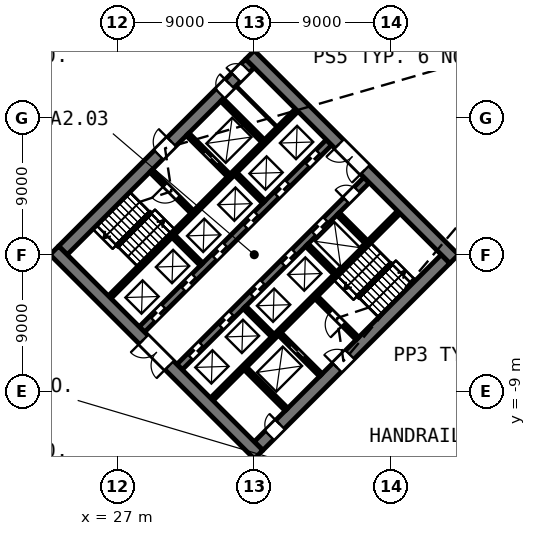
"""IFC4 building model, lengths in metres.
Left out: names, types, materials, properties, quantities, classifications, styles, units other than length and angle.
Written with IfcOpenShell. Run it as: python <this file> out.ifc"""

import sys

from ifc_helpers import new_model, si_unit, direction, frame, frame_2d, origin, place, context, subcontext, project, spatial, rectangle, extrude, element, fill, save


model = new_model("IFC4")
c1 = context("Model", 3, precision=1e-05, world=origin(), true_north=direction((0.0, 1.0)))
c2 = subcontext(c1, "Body", "Model", "MODEL_VIEW")
j1 = project(units=[si_unit("LENGTHUNIT", "METRE"), si_unit("PLANEANGLEUNIT", "RADIAN")], contexts=[c1])
p1 = place(None, origin())
s1 = spatial("IfcSite", under=j1, at=p1, CompositionType="ELEMENT")
p2 = place(p1, origin())
s2 = spatial("IfcBuilding", under=s1, at=p2, CompositionType="ELEMENT")
p3 = place(p2, origin())
s3 = spatial("IfcBuildingStorey", under=s2, at=p3, CompositionType="ELEMENT", Elevation=0.0)
p4 = place(p3, frame((36.283, -12.586, 0.0), z_axis=(0.0, 0.0, 1.0), x_axis=(0.707106781187, 0.707106781187, 0.0)))
e1 = element("IfcWall", 1, at=p4, inside=s3, PredefinedType="SHEAR", context=c2, shape_type="SweptSolid", body=[
    extrude(rectangle(XDim=17.4, YDim=0.8, at=frame_2d((8.7, 0.0))), origin(), (0.0, 0.0, 1.0), 6.9),
])
p5 = place(p4, frame((7.3, 0.0, 0.0)))
e2 = element("IfcOpeningElement", 2, at=p5, cuts=e1, PredefinedType="OPENING", context=c2, shape_type="SweptSolid", body=[
    extrude(rectangle(XDim=1.2, YDim=2.1, at=frame_2d((0.6, 1.05))), frame((0.0, 0.41, 0.0), z_axis=(0.0, -1.0, 0.0), x_axis=(1.0, 0.0, 0.0)), (0.0, 0.0, 1.0), 0.82),
])
p6 = place(p4, frame((1.0, 0.0, 0.0)))
e3 = element("IfcOpeningElement", 3, at=p6, cuts=e1, PredefinedType="OPENING", context=c2, shape_type="SweptSolid", body=[
    extrude(rectangle(XDim=1.0, YDim=2.1, at=frame_2d((0.5, 1.05))), frame((0.0, 0.41, 0.0), z_axis=(0.0, -1.0, 0.0), x_axis=(1.0, 0.0, 0.0)), (0.0, 0.0, 1.0), 0.82),
])
p7 = place(p3, frame((33.207, -9.51, 0.0), z_axis=(0.0, 0.0, 1.0), x_axis=(0.707106781187, 0.707106781187, 0.0)))
e4 = element("IfcWall", 4, at=p7, inside=s3, PredefinedType="SHEAR", context=c2, shape_type="SweptSolid", body=[
    extrude(rectangle(XDim=17.4, YDim=0.25, at=frame_2d((8.7, 0.0))), origin(), (0.0, 0.0, 1.0), 6.9),
])
p8 = place(p3, frame((31.086, -7.389, 0.0), z_axis=(0.0, 0.0, 1.0), x_axis=(0.707106781187, 0.707106781187, 0.0)))
e5 = element("IfcWall", 5, at=p8, inside=s3, PredefinedType="SHEAR", context=c2, shape_type="SweptSolid", body=[
    extrude(rectangle(XDim=17.4, YDim=0.5, at=frame_2d((8.7, 0.0))), origin(), (0.0, 0.0, 1.0), 6.9),
])
p9 = place(p8, frame((0.962, 0.0, 0.0)))
e6 = element("IfcOpeningElement", 6, at=p9, cuts=e5, PredefinedType="OPENING", context=c2, shape_type="SweptSolid", body=[
    extrude(rectangle(XDim=1.1, YDim=2.1, at=frame_2d((0.55, 1.05))), frame((0.0, 0.26, 0.0), z_axis=(0.0, -1.0, 0.0), x_axis=(1.0, 0.0, 0.0)), (0.0, 0.0, 1.0), 0.52),
])
p10 = place(p8, frame((3.8, 0.0, 0.0)))
e7 = element("IfcOpeningElement", 7, at=p10, cuts=e5, PredefinedType="OPENING", context=c2, shape_type="SweptSolid", body=[
    extrude(rectangle(XDim=1.1, YDim=2.1, at=frame_2d((0.55, 1.05))), frame((0.0, 0.26, 0.0), z_axis=(0.0, -1.0, 0.0), x_axis=(1.0, 0.0, 0.0)), (0.0, 0.0, 1.0), 0.52),
])
p11 = place(p8, frame((6.7, 0.0, 0.0)))
e8 = element("IfcOpeningElement", 8, at=p11, cuts=e5, PredefinedType="OPENING", context=c2, shape_type="SweptSolid", body=[
    extrude(rectangle(XDim=1.1, YDim=2.1, at=frame_2d((0.55, 1.05))), frame((0.0, 0.26, 0.0), z_axis=(0.0, -1.0, 0.0), x_axis=(1.0, 0.0, 0.0)), (0.0, 0.0, 1.0), 0.52),
])
p12 = place(p8, frame((9.6, 0.0, 0.0)))
e9 = element("IfcOpeningElement", 9, at=p12, cuts=e5, PredefinedType="OPENING", context=c2, shape_type="SweptSolid", body=[
    extrude(rectangle(XDim=1.1, YDim=2.1, at=frame_2d((0.55, 1.05))), frame((0.0, 0.26, 0.0), z_axis=(0.0, -1.0, 0.0), x_axis=(1.0, 0.0, 0.0)), (0.0, 0.0, 1.0), 0.52),
])
p13 = place(p8, frame((12.45, 0.0, 0.0)))
e10 = element("IfcOpeningElement", 10, at=p13, cuts=e5, PredefinedType="OPENING", context=c2, shape_type="SweptSolid", body=[
    extrude(rectangle(XDim=1.2, YDim=2.1, at=frame_2d((0.6, 1.05))), frame((0.0, 0.26, 0.0), z_axis=(0.0, -1.0, 0.0), x_axis=(1.0, 0.0, 0.0)), (0.0, 0.0, 1.0), 0.52),
])
p14 = place(p8, frame((15.5, 0.0, 0.0)))
e11 = element("IfcOpeningElement", 11, at=p14, cuts=e5, PredefinedType="OPENING", context=c2, shape_type="SweptSolid", body=[
    extrude(rectangle(XDim=1.0, YDim=2.1, at=frame_2d((0.5, 1.05))), frame((0.0, 0.26, 0.0), z_axis=(0.0, -1.0, 0.0), x_axis=(1.0, 0.0, 0.0)), (0.0, 0.0, 1.0), 0.52),
])
p15 = place(p3, frame((28.611, -4.914, 0.0), z_axis=(0.0, 0.0, 1.0), x_axis=(0.707106781187, 0.707106781187, 0.0)))
e12 = element("IfcWall", 12, at=p15, inside=s3, PredefinedType="SHEAR", context=c2, shape_type="SweptSolid", body=[
    extrude(rectangle(XDim=17.4, YDim=0.5, at=frame_2d((8.7, 0.0))), origin(), (0.0, 0.0, 1.0), 6.9),
])
p16 = place(p15, frame((0.962, 0.0, 0.0)))
e13 = element("IfcOpeningElement", 13, at=p16, cuts=e12, PredefinedType="OPENING", context=c2, shape_type="SweptSolid", body=[
    extrude(rectangle(XDim=1.1, YDim=2.1, at=frame_2d((0.55, 1.05))), frame((0.0, 0.26, 0.0), z_axis=(0.0, -1.0, 0.0), x_axis=(1.0, 0.0, 0.0)), (0.0, 0.0, 1.0), 0.52),
])
p17 = place(p15, frame((3.8, 0.0, 0.0)))
e14 = element("IfcOpeningElement", 14, at=p17, cuts=e12, PredefinedType="OPENING", context=c2, shape_type="SweptSolid", body=[
    extrude(rectangle(XDim=1.1, YDim=2.1, at=frame_2d((0.55, 1.05))), frame((0.0, 0.26, 0.0), z_axis=(0.0, -1.0, 0.0), x_axis=(1.0, 0.0, 0.0)), (0.0, 0.0, 1.0), 0.52),
])
p18 = place(p15, frame((6.7, 0.0, 0.0)))
e15 = element("IfcOpeningElement", 15, at=p18, cuts=e12, PredefinedType="OPENING", context=c2, shape_type="SweptSolid", body=[
    extrude(rectangle(XDim=1.1, YDim=2.1, at=frame_2d((0.55, 1.05))), frame((0.0, 0.26, 0.0), z_axis=(0.0, -1.0, 0.0), x_axis=(1.0, 0.0, 0.0)), (0.0, 0.0, 1.0), 0.52),
])
p19 = place(p15, frame((9.6, 0.0, 0.0)))
e16 = element("IfcOpeningElement", 16, at=p19, cuts=e12, PredefinedType="OPENING", context=c2, shape_type="SweptSolid", body=[
    extrude(rectangle(XDim=1.1, YDim=2.1, at=frame_2d((0.55, 1.05))), frame((0.0, 0.26, 0.0), z_axis=(0.0, -1.0, 0.0), x_axis=(1.0, 0.0, 0.0)), (0.0, 0.0, 1.0), 0.52),
])
p20 = place(p15, frame((12.5, 0.0, 0.0)))
e17 = element("IfcOpeningElement", 17, at=p20, cuts=e12, PredefinedType="OPENING", context=c2, shape_type="SweptSolid", body=[
    extrude(rectangle(XDim=1.1, YDim=2.1, at=frame_2d((0.55, 1.05))), frame((0.0, 0.26, 0.0), z_axis=(0.0, -1.0, 0.0), x_axis=(1.0, 0.0, 0.0)), (0.0, 0.0, 1.0), 0.52),
])
p21 = place(p15, frame((15.337, 0.0, 0.0)))
e18 = element("IfcOpeningElement", 18, at=p21, cuts=e12, PredefinedType="OPENING", context=c2, shape_type="SweptSolid", body=[
    extrude(rectangle(XDim=1.1, YDim=2.1, at=frame_2d((0.55, 1.05))), frame((0.0, 0.26, 0.0), z_axis=(0.0, -1.0, 0.0), x_axis=(1.0, 0.0, 0.0)), (0.0, 0.0, 1.0), 0.52),
])
p22 = place(p3, frame((26.49, -2.793, 0.0), z_axis=(0.0, 0.0, 1.0), x_axis=(0.707106781187, 0.707106781187, 0.0)))
e19 = element("IfcWall", 19, at=p22, inside=s3, PredefinedType="SHEAR", context=c2, shape_type="SweptSolid", body=[
    extrude(rectangle(XDim=17.4, YDim=0.25, at=frame_2d((8.7, 0.0))), origin(), (0.0, 0.0, 1.0), 6.9),
])
p23 = place(p3, frame((23.414, 0.283, 0.0), z_axis=(0.0, 0.0, 1.0), x_axis=(0.707106781187, 0.707106781187, 0.0)))
e20 = element("IfcWall", 20, at=p23, inside=s3, PredefinedType="SHEAR", context=c2, shape_type="SweptSolid", body=[
    extrude(rectangle(XDim=17.4, YDim=0.8, at=frame_2d((8.7, 0.0))), origin(), (0.0, 0.0, 1.0), 6.9),
])
p24 = place(p23, frame((8.9, 0.0, 0.0)))
e21 = element("IfcOpeningElement", 21, at=p24, cuts=e20, PredefinedType="OPENING", context=c2, shape_type="SweptSolid", body=[
    extrude(rectangle(XDim=1.2, YDim=2.1, at=frame_2d((0.6, 1.05))), frame((0.0, 0.41, 0.0), z_axis=(0.0, -1.0, 0.0), x_axis=(1.0, 0.0, 0.0)), (0.0, 0.0, 1.0), 0.82),
])
p25 = place(p23, frame((14.6, 0.0, 0.0)))
e22 = element("IfcOpeningElement", 22, at=p25, cuts=e20, PredefinedType="OPENING", context=c2, shape_type="SweptSolid", body=[
    extrude(rectangle(XDim=0.9, YDim=2.1, at=frame_2d((0.45, 1.05))), frame((0.0, 0.41, 0.0), z_axis=(0.0, -1.0, 0.0), x_axis=(1.0, 0.0, 0.0)), (0.0, 0.0, 1.0), 0.82),
])
p26 = place(p23, frame((16.1, 0.0, 0.0)))
e23 = element("IfcOpeningElement", 23, at=p26, cuts=e20, PredefinedType="OPENING", context=c2, shape_type="SweptSolid", body=[
    extrude(rectangle(XDim=0.9, YDim=2.1, at=frame_2d((0.45, 1.05))), frame((0.0, 0.41, 0.0), z_axis=(0.0, -1.0, 0.0), x_axis=(1.0, 0.0, 0.0)), (0.0, 0.0, 1.0), 0.82),
])
p27 = place(p3, frame((36.283, -13.152, 0.0), z_axis=(0.0, 0.0, 1.0), x_axis=(-0.707106781187, 0.707106781187, 0.0)))
e24 = element("IfcWall", 24, at=p27, inside=s3, PredefinedType="SHEAR", context=c2, shape_type="SweptSolid", body=[
    extrude(rectangle(XDim=19.0, YDim=0.8, at=frame_2d((9.5, 0.0))), origin(), (0.0, 0.0, 1.0), 6.9),
])
p28 = place(p27, frame((8.3, 0.0, 0.0)))
e25 = element("IfcOpeningElement", 25, at=p28, cuts=e24, PredefinedType="OPENING", context=c2, shape_type="SweptSolid", body=[
    extrude(rectangle(XDim=2.4, YDim=2.1, at=frame_2d((1.2, 1.05))), frame((0.0, 0.41, 0.0), z_axis=(0.0, -1.0, 0.0), x_axis=(1.0, 0.0, 0.0)), (0.0, 0.0, 1.0), 0.82),
])
p29 = place(p3, frame((38.121, -10.182, 0.0), z_axis=(0.0, 0.0, 1.0), x_axis=(-0.707138693938, 0.707074866995, 0.0)))
e26 = element("IfcWall", 26, at=p29, inside=s3, PredefinedType="SHEAR", context=c2, shape_type="SweptSolid", body=[
    extrude(rectangle(XDim=3.825, YDim=0.25, at=frame_2d((1.913, 0.0))), origin(), (0.0, 0.0, 1.0), 6.9),
])
for number, where, z_axis, x_axis in (
    (27, (37.22, -5.321, 0.0), (0.0, 0.0, 1.0), (-0.707, 0.707, 0.0)),
    (28, (32.535, -0.636, 0.0), (0.0, 0.0, 1.0), (-0.707, 0.707, 0.0)),
):
    element("IfcWall", number, at=place(p3, frame(where, z_axis=z_axis, x_axis=x_axis)), inside=s3, PredefinedType="SHEAR", context=c2, shape_type="SweptSolid", body=[
        extrude(rectangle(XDim=2.625, YDim=0.25, at=frame_2d((1.312, 0.0))), origin(), (0.0, 0.0, 1.0), 6.9),
    ])
p30 = place(p3, frame((40.384, -7.92, 0.0), z_axis=(0.0, 0.0, 1.0), x_axis=(-0.707074866995, 0.707138693938, 0.0)))
e29 = element("IfcWall", 29, at=p30, inside=s3, PredefinedType="SHEAR", context=c2, shape_type="SweptSolid", body=[
    extrude(rectangle(XDim=3.825, YDim=0.25, at=frame_2d((1.913, 0.0))), origin(), (0.0, 0.0, 1.0), 6.9),
])
p31 = place(p30, frame((1.6, 0.0, 0.0)))
e30 = element("IfcOpeningElement", 30, at=p31, cuts=e29, PredefinedType="OPENING", context=c2, shape_type="SweptSolid", body=[
    extrude(rectangle(XDim=1.2, YDim=2.1, at=frame_2d((0.6, 1.05))), frame((0.0, 0.135, 0.0), z_axis=(0.0, -1.0, 0.0), x_axis=(1.0, 0.0, 0.0)), (0.0, 0.0, 1.0), 0.27),
])
p32 = place(p3, frame((31.917, 2.811, 0.0), z_axis=(0.0, 0.0, 1.0), x_axis=(-0.707106781187, 0.707106781187, 0.0)))
e31 = element("IfcWall", 31, at=p32, inside=s3, PredefinedType="SHEAR", context=c2, shape_type="SweptSolid", body=[
    extrude(rectangle(XDim=3.825, YDim=0.25, at=frame_2d((1.913, 0.0))), origin(), (0.0, 0.0, 1.0), 6.9),
])
p33 = place(p32, frame((1.325, 0.0, 0.0)))
e32 = element("IfcOpeningElement", 32, at=p33, cuts=e31, PredefinedType="OPENING", context=c2, shape_type="SweptSolid", body=[
    extrude(rectangle(XDim=1.2, YDim=2.1, at=frame_2d((0.6, 1.05))), frame((0.0, 0.135, 0.0), z_axis=(0.0, -1.0, 0.0), x_axis=(1.0, 0.0, 0.0)), (0.0, 0.0, 1.0), 0.27),
])
p34 = place(p3, frame((42.788, -5.515, 0.0), z_axis=(0.0, 0.0, 1.0), x_axis=(-0.707106781187, 0.707106781187, 0.0)))
e33 = element("IfcWall", 33, at=p34, inside=s3, PredefinedType="SHEAR", context=c2, shape_type="SweptSolid", body=[
    extrude(rectangle(XDim=3.825, YDim=0.25, at=frame_2d((1.913, 0.0))), origin(), (0.0, 0.0, 1.0), 6.9),
])
p35 = place(p34, frame((1.3, 0.0, 0.0)))
e34 = element("IfcOpeningElement", 34, at=p35, cuts=e33, PredefinedType="OPENING", context=c2, shape_type="SweptSolid", body=[
    extrude(rectangle(XDim=1.2, YDim=2.1, at=frame_2d((0.6, 1.05))), frame((0.0, 0.135, 0.0), z_axis=(0.0, -1.0, 0.0), x_axis=(1.0, 0.0, 0.0)), (0.0, 0.0, 1.0), 0.27),
])
p36 = place(p3, frame((34.321, 5.215, 0.0), z_axis=(0.0, 0.0, 1.0), x_axis=(-0.707074866995, 0.707138693938, 0.0)))
e35 = element("IfcWall", 35, at=p36, inside=s3, PredefinedType="SHEAR", context=c2, shape_type="SweptSolid", body=[
    extrude(rectangle(XDim=3.825, YDim=0.25, at=frame_2d((1.913, 0.0))), origin(), (0.0, 0.0, 1.0), 6.9),
])
p37 = place(p36, frame((1.025, 0.0, 0.0)))
e36 = element("IfcOpeningElement", 36, at=p37, cuts=e35, PredefinedType="OPENING", context=c2, shape_type="SweptSolid", body=[
    extrude(rectangle(XDim=1.2, YDim=2.1, at=frame_2d((0.6, 1.05))), frame((0.0, 0.135, 0.0), z_axis=(0.0, -1.0, 0.0), x_axis=(1.0, 0.0, 0.0)), (0.0, 0.0, 1.0), 0.27),
])
for number, where, z_axis, x_axis in (
    (37, (41.321, -1.22, 0.0), (0.0, 0.0, 1.0), (-0.707, 0.707, 0.0)),
    (38, (36.636, 3.465, 0.0), (0.0, 0.0, 1.0), (-0.707, 0.707, 0.0)),
):
    element("IfcWall", number, at=place(p3, frame(where, z_axis=z_axis, x_axis=x_axis)), inside=s3, PredefinedType="SHEAR", context=c2, shape_type="SweptSolid", body=[
        extrude(rectangle(XDim=2.625, YDim=0.25, at=frame_2d((1.312, 0.0))), origin(), (0.0, 0.0, 1.0), 6.9),
    ])
p38 = place(p3, frame((36.583, 7.478, 0.0), z_axis=(0.0, 0.0, 1.0), x_axis=(-0.707138693938, 0.707074866995, 0.0)))
e39 = element("IfcWall", 39, at=p38, inside=s3, PredefinedType="SHEAR", context=c2, shape_type="SweptSolid", body=[
    extrude(rectangle(XDim=3.825, YDim=0.25, at=frame_2d((1.913, 0.0))), origin(), (0.0, 0.0, 1.0), 6.9),
])
p39 = place(p3, frame((43.372, 0.831, 0.0), z_axis=(0.0, 0.0, 1.0), x_axis=(-0.707106781187, 0.707106781187, 0.0)))
e40 = element("IfcWall", 40, at=p39, inside=s3, PredefinedType="SHEAR", context=c2, shape_type="SweptSolid", body=[
    extrude(rectangle(XDim=2.625, YDim=0.25, at=frame_2d((1.312, 0.0))), origin(), (0.0, 0.0, 1.0), 6.9),
])
p40 = place(p3, frame((37.503, 8.397, 0.0), z_axis=(0.0, 0.0, 1.0), x_axis=(-0.707138693938, 0.707074866995, 0.0)))
e41 = element("IfcWall", 41, at=p40, inside=s3, PredefinedType="PARTITIONING", context=c2, shape_type="SweptSolid", body=[
    extrude(rectangle(XDim=3.825, YDim=0.15, at=frame_2d((1.913, 0.0))), origin(), (0.0, 0.0, 1.0), 6.9),
])
p41 = place(p3, frame((49.152, -0.283, 0.0), z_axis=(0.0, 0.0, 1.0), x_axis=(-0.707106781187, 0.707106781187, 0.0)))
e42 = element("IfcWall", 42, at=p41, inside=s3, PredefinedType="SHEAR", context=c2, shape_type="SweptSolid", body=[
    extrude(rectangle(XDim=19.0, YDim=0.8, at=frame_2d((9.5, 0.0))), origin(), (0.0, 0.0, 1.0), 6.9),
])
p42 = place(p41, frame((8.3, 0.0, 0.0)))
e43 = element("IfcOpeningElement", 43, at=p42, cuts=e42, PredefinedType="OPENING", context=c2, shape_type="SweptSolid", body=[
    extrude(rectangle(XDim=2.4, YDim=2.1, at=frame_2d((1.2, 1.05))), frame((0.0, 0.41, 0.0), z_axis=(0.0, -1.0, 0.0), x_axis=(1.0, 0.0, 0.0)), (0.0, 0.0, 1.0), 0.82),
])
p43 = place(p28, origin())
e44 = element("IfcDoor", 44, at=p43, inside=s3, OperationType="DOUBLE_DOOR_SINGLE_SWING", PredefinedType="DOOR", context=c2, shape_type="SweptSolid", body=[
    extrude(rectangle(XDim=2.4, YDim=2.1, at=frame_2d((1.2, 1.05))), frame((0.0, -0.225, 0.0), z_axis=(0.0, -1.0, 0.0), x_axis=(1.0, 0.0, 0.0)), (0.0, 0.0, 1.0), 0.05),
])
fill(e25, e44)
p44 = place(p42, origin())
e45 = element("IfcDoor", 45, at=p44, inside=s3, OperationType="DOUBLE_DOOR_SINGLE_SWING", PredefinedType="DOOR", context=c2, shape_type="SweptSolid", body=[
    extrude(rectangle(XDim=2.4, YDim=2.1, at=frame_2d((1.2, 1.05))), frame((0.0, 0.275, 0.0), z_axis=(0.0, -1.0, 0.0), x_axis=(1.0, 0.0, 0.0)), (0.0, 0.0, 1.0), 0.05),
])
fill(e43, e45)
p45 = place(p16, origin())
e46 = element("IfcDoor", 46, at=p45, inside=s3, OperationType="SLIDING_TO_LEFT", PredefinedType="DOOR", context=c2, shape_type="SweptSolid", body=[
    extrude(rectangle(XDim=1.1, YDim=2.1, at=frame_2d((0.55, 1.05))), frame((0.0, 0.025, 0.0), z_axis=(0.0, -1.0, 0.0), x_axis=(1.0, 0.0, 0.0)), (0.0, 0.0, 1.0), 0.05),
])
fill(e13, e46)
p46 = place(p17, origin())
e47 = element("IfcDoor", 47, at=p46, inside=s3, OperationType="SLIDING_TO_LEFT", PredefinedType="DOOR", context=c2, shape_type="SweptSolid", body=[
    extrude(rectangle(XDim=1.1, YDim=2.1, at=frame_2d((0.55, 1.05))), frame((0.0, 0.025, 0.0), z_axis=(0.0, -1.0, 0.0), x_axis=(1.0, 0.0, 0.0)), (0.0, 0.0, 1.0), 0.05),
])
fill(e14, e47)
p47 = place(p18, origin())
e48 = element("IfcDoor", 48, at=p47, inside=s3, OperationType="SLIDING_TO_LEFT", PredefinedType="DOOR", context=c2, shape_type="SweptSolid", body=[
    extrude(rectangle(XDim=1.1, YDim=2.1, at=frame_2d((0.55, 1.05))), frame((0.0, 0.025, 0.0), z_axis=(0.0, -1.0, 0.0), x_axis=(1.0, 0.0, 0.0)), (0.0, 0.0, 1.0), 0.05),
])
fill(e15, e48)
p48 = place(p19, origin())
e49 = element("IfcDoor", 49, at=p48, inside=s3, OperationType="SLIDING_TO_LEFT", PredefinedType="DOOR", context=c2, shape_type="SweptSolid", body=[
    extrude(rectangle(XDim=1.1, YDim=2.1, at=frame_2d((0.55, 1.05))), frame((0.0, 0.025, 0.0), z_axis=(0.0, -1.0, 0.0), x_axis=(1.0, 0.0, 0.0)), (0.0, 0.0, 1.0), 0.05),
])
fill(e16, e49)
p49 = place(p20, origin())
e50 = element("IfcDoor", 50, at=p49, inside=s3, OperationType="SLIDING_TO_LEFT", PredefinedType="DOOR", context=c2, shape_type="SweptSolid", body=[
    extrude(rectangle(XDim=1.1, YDim=2.1, at=frame_2d((0.55, 1.05))), frame((0.0, 0.025, 0.0), z_axis=(0.0, -1.0, 0.0), x_axis=(1.0, 0.0, 0.0)), (0.0, 0.0, 1.0), 0.05),
])
fill(e17, e50)
p50 = place(p21, origin())
e51 = element("IfcDoor", 51, at=p50, inside=s3, OperationType="SLIDING_TO_LEFT", PredefinedType="DOOR", context=c2, shape_type="SweptSolid", body=[
    extrude(rectangle(XDim=1.1, YDim=2.1, at=frame_2d((0.55, 1.05))), frame((0.0, 0.025, 0.0), z_axis=(0.0, -1.0, 0.0), x_axis=(1.0, 0.0, 0.0)), (0.0, 0.0, 1.0), 0.05),
])
fill(e18, e51)
p51 = place(p9, origin())
e52 = element("IfcDoor", 52, at=p51, inside=s3, OperationType="SLIDING_TO_LEFT", PredefinedType="DOOR", context=c2, shape_type="SweptSolid", body=[
    extrude(rectangle(XDim=1.1, YDim=2.1, at=frame_2d((0.55, 1.05))), frame((0.0, 0.025, 0.0), z_axis=(0.0, -1.0, 0.0), x_axis=(1.0, 0.0, 0.0)), (0.0, 0.0, 1.0), 0.05),
])
fill(e6, e52)
p52 = place(p10, origin())
e53 = element("IfcDoor", 53, at=p52, inside=s3, OperationType="SLIDING_TO_LEFT", PredefinedType="DOOR", context=c2, shape_type="SweptSolid", body=[
    extrude(rectangle(XDim=1.1, YDim=2.1, at=frame_2d((0.55, 1.05))), frame((0.0, 0.025, 0.0), z_axis=(0.0, -1.0, 0.0), x_axis=(1.0, 0.0, 0.0)), (0.0, 0.0, 1.0), 0.05),
])
fill(e7, e53)
p53 = place(p11, origin())
e54 = element("IfcDoor", 54, at=p53, inside=s3, OperationType="SLIDING_TO_LEFT", PredefinedType="DOOR", context=c2, shape_type="SweptSolid", body=[
    extrude(rectangle(XDim=1.1, YDim=2.1, at=frame_2d((0.55, 1.05))), frame((0.0, 0.025, 0.0), z_axis=(0.0, -1.0, 0.0), x_axis=(1.0, 0.0, 0.0)), (0.0, 0.0, 1.0), 0.05),
])
fill(e8, e54)
p54 = place(p12, origin())
e55 = element("IfcDoor", 55, at=p54, inside=s3, OperationType="SLIDING_TO_LEFT", PredefinedType="DOOR", context=c2, shape_type="SweptSolid", body=[
    extrude(rectangle(XDim=1.1, YDim=2.1, at=frame_2d((0.55, 1.05))), frame((0.0, 0.025, 0.0), z_axis=(0.0, -1.0, 0.0), x_axis=(1.0, 0.0, 0.0)), (0.0, 0.0, 1.0), 0.05),
])
fill(e9, e55)
p55 = place(p13, origin())
e56 = element("IfcDoor", 56, at=p55, inside=s3, OperationType="SLIDING_TO_LEFT", PredefinedType="DOOR", context=c2, shape_type="SweptSolid", body=[
    extrude(rectangle(XDim=1.2, YDim=2.1, at=frame_2d((0.6, 1.05))), frame((0.0, 0.025, 0.0), z_axis=(0.0, -1.0, 0.0), x_axis=(1.0, 0.0, 0.0)), (0.0, 0.0, 1.0), 0.05),
])
fill(e10, e56)
p56 = place(p37, origin())
e57 = element("IfcDoor", 57, at=p56, inside=s3, OperationType="SLIDING_TO_LEFT", PredefinedType="DOOR", context=c2, shape_type="SweptSolid", body=[
    extrude(rectangle(XDim=1.2, YDim=2.1, at=frame_2d((0.6, 1.05))), frame((0.0, 0.025, 0.0), z_axis=(0.0, -1.0, 0.0), x_axis=(1.0, 0.0, 0.0)), (0.0, 0.0, 1.0), 0.05),
])
fill(e36, e57)
p57 = place(p31, origin())
e58 = element("IfcDoor", 58, at=p57, inside=s3, OperationType="SLIDING_TO_LEFT", PredefinedType="DOOR", context=c2, shape_type="SweptSolid", body=[
    extrude(rectangle(XDim=1.2, YDim=2.1, at=frame_2d((0.6, 1.05))), frame((0.0, 0.025, 0.0), z_axis=(0.0, -1.0, 0.0), x_axis=(1.0, 0.0, 0.0)), (0.0, 0.0, 1.0), 0.05),
])
fill(e30, e58)
p58 = place(p14, origin())
e59 = element("IfcDoor", 59, at=p58, inside=s3, OperationType="SINGLE_SWING_LEFT", PredefinedType="DOOR", context=c2, shape_type="SweptSolid", body=[
    extrude(rectangle(XDim=1.0, YDim=2.1, at=frame_2d((0.5, 1.05))), frame((0.0, 0.025, 0.0), z_axis=(0.0, -1.0, 0.0), x_axis=(1.0, 0.0, 0.0)), (0.0, 0.0, 1.0), 0.05),
])
fill(e11, e59)
p59 = place(p33, origin())
e60 = element("IfcDoor", 60, at=p59, inside=s3, OperationType="SINGLE_SWING_RIGHT", PredefinedType="DOOR", context=c2, shape_type="SweptSolid", body=[
    extrude(rectangle(XDim=1.2, YDim=2.1, at=frame_2d((0.6, 1.05))), frame((0.0, 0.025, 0.0), z_axis=(0.0, -1.0, 0.0), x_axis=(1.0, 0.0, 0.0)), (0.0, 0.0, 1.0), 0.05),
])
fill(e32, e60)
p60 = place(p35, origin())
e61 = element("IfcDoor", 61, at=p60, inside=s3, OperationType="SINGLE_SWING_LEFT", PredefinedType="DOOR", context=c2, shape_type="SweptSolid", body=[
    extrude(rectangle(XDim=1.2, YDim=2.1, at=frame_2d((0.6, 1.05))), frame((0.0, 0.025, 0.0), z_axis=(0.0, -1.0, 0.0), x_axis=(1.0, 0.0, 0.0)), (0.0, 0.0, 1.0), 0.05),
])
fill(e34, e61)
p61 = place(p24, origin())
e62 = element("IfcDoor", 62, at=p61, inside=s3, OperationType="SINGLE_SWING_RIGHT", PredefinedType="DOOR", context=c2, shape_type="SweptSolid", body=[
    extrude(rectangle(XDim=1.2, YDim=2.1, at=frame_2d((0.6, 1.05))), frame((0.0, -0.225, 0.0), z_axis=(0.0, -1.0, 0.0), x_axis=(1.0, 0.0, 0.0)), (0.0, 0.0, 1.0), 0.05),
])
fill(e21, e62)
p62 = place(p5, origin())
e63 = element("IfcDoor", 63, at=p62, inside=s3, OperationType="SINGLE_SWING_LEFT", PredefinedType="DOOR", context=c2, shape_type="SweptSolid", body=[
    extrude(rectangle(XDim=1.2, YDim=2.1, at=frame_2d((0.6, 1.05))), frame((0.0, 0.275, 0.0), z_axis=(0.0, -1.0, 0.0), x_axis=(1.0, 0.0, 0.0)), (0.0, 0.0, 1.0), 0.05),
])
fill(e2, e63)
p63 = place(p25, origin())
e64 = element("IfcDoor", 64, at=p63, inside=s3, OperationType="SINGLE_SWING_RIGHT", PredefinedType="DOOR", context=c2, shape_type="SweptSolid", body=[
    extrude(rectangle(XDim=0.9, YDim=2.1, at=frame_2d((0.45, 1.05))), frame((0.0, -0.225, 0.0), z_axis=(0.0, -1.0, 0.0), x_axis=(1.0, 0.0, 0.0)), (0.0, 0.0, 1.0), 0.05),
])
fill(e22, e64)
p64 = place(p26, origin())
e65 = element("IfcDoor", 65, at=p64, inside=s3, OperationType="SINGLE_SWING_LEFT", PredefinedType="DOOR", context=c2, shape_type="SweptSolid", body=[
    extrude(rectangle(XDim=0.9, YDim=2.1, at=frame_2d((0.45, 1.05))), frame((0.0, -0.225, 0.0), z_axis=(0.0, -1.0, 0.0), x_axis=(1.0, 0.0, 0.0)), (0.0, 0.0, 1.0), 0.05),
])
fill(e23, e65)
p65 = place(p6, origin())
e66 = element("IfcDoor", 66, at=p65, inside=s3, OperationType="SINGLE_SWING_RIGHT", PredefinedType="DOOR", context=c2, shape_type="SweptSolid", body=[
    extrude(rectangle(XDim=1.0, YDim=2.1, at=frame_2d((0.5, 1.05))), frame((0.0, 0.275, 0.0), z_axis=(0.0, -1.0, 0.0), x_axis=(1.0, 0.0, 0.0)), (0.0, 0.0, 1.0), 0.05),
])
fill(e3, e66)
save(model, sys.argv[1])
